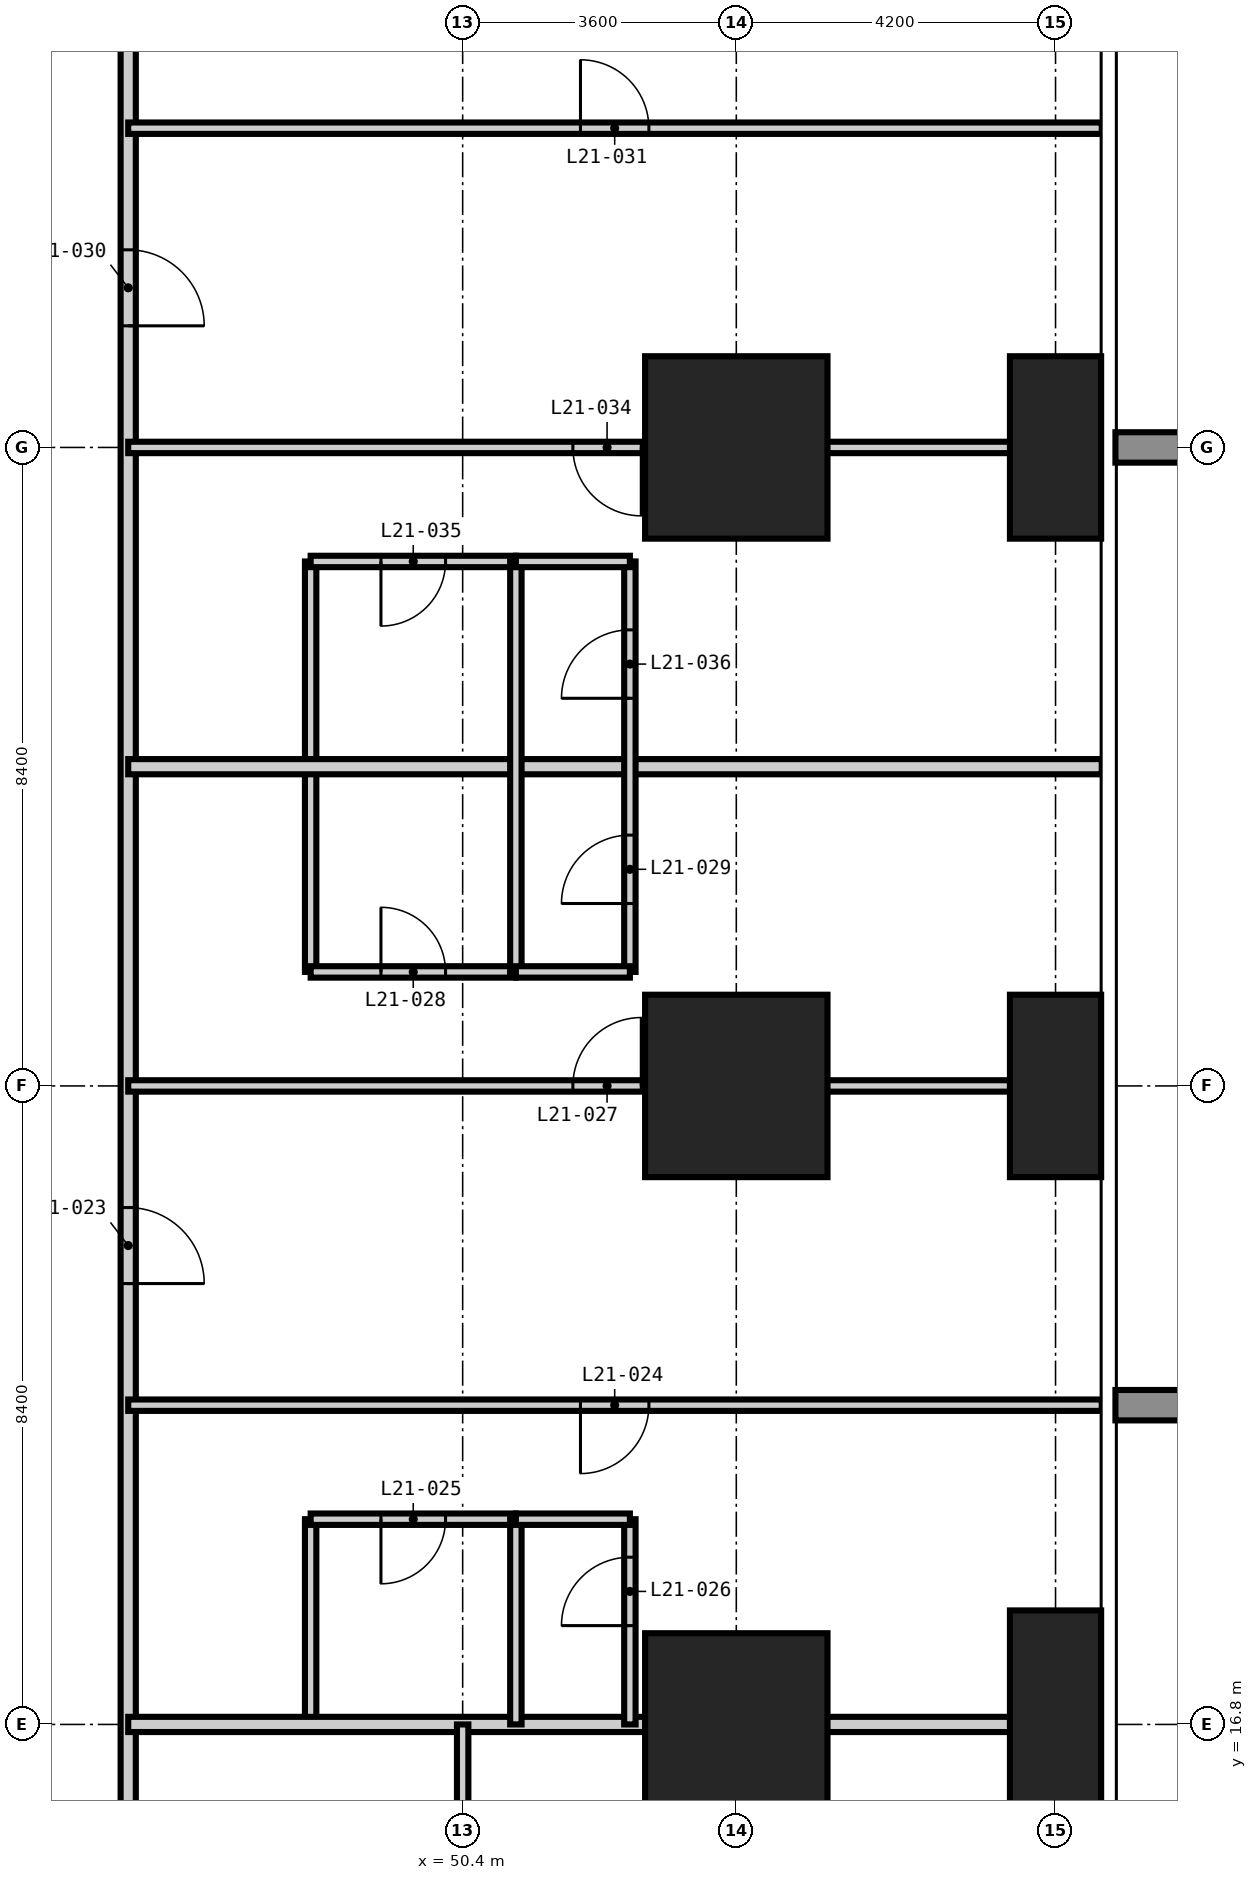
"""IFC4 building model, lengths in metres.
Left out: names, types, materials, properties, quantities, classifications, styles, units other than length and angle.
Written with IfcOpenShell. Run it as: python <this file> out.ifc"""

import sys

from ifc_helpers import new_model, si_unit, direction, frame, frame_2d, origin, origin_2d, place, context, subcontext, project, spatial, rectangle, extrude, element, fill, save


model = new_model("IFC4")
c1 = context("Model", 3, precision=1e-05, world=origin(), true_north=direction((0.0, 1.0)))
c2 = subcontext(c1, "Body", "Model", "MODEL_VIEW")
j1 = project(units=[si_unit("LENGTHUNIT", "METRE"), si_unit("PLANEANGLEUNIT", "RADIAN")], contexts=[c1])
p1 = place(None, origin())
s1 = spatial("IfcSite", under=j1, at=p1, CompositionType="ELEMENT")
p2 = place(p1, origin())
s2 = spatial("IfcBuilding", under=s1, at=p2, CompositionType="ELEMENT")
p3 = place(p2, frame((0.0, 0.0, 84.6)))
s3 = spatial("IfcBuildingStorey", under=s2, at=p3, CompositionType="ELEMENT", Elevation=84.6)
for number, where, z_axis, x_axis in (
    (1, (54.0, 16.8, -0.35), (0.0, 0.0, 1.0), (1.0, 0.0, 0.0)),
    (2, (54.0, 25.2, -0.35), (0.0, 0.0, 1.0), (1.0, 0.0, 0.0)),
    (3, (54.0, 33.6, -0.35), (0.0, 0.0, 1.0), (1.0, 0.0, 0.0)),
):
    element("IfcColumn", number, at=place(p3, frame(where, z_axis=z_axis, x_axis=x_axis)), inside=s3, PredefinedType="COLUMN", context=c2, shape_type="SweptSolid", body=[
        extrude(rectangle(XDim=2.4, YDim=2.4, at=origin_2d()), origin(), (0.0, 0.0, 1.0), 3.55),
    ])
p4 = place(p3, frame((58.2, 16.8, -0.35), z_axis=(0.0, 0.0, 1.0), x_axis=(1.0, 0.0, 0.0)))
e4 = element("IfcColumn", 4, at=p4, inside=s3, PredefinedType="COLUMN", context=c2, shape_type="SweptSolid", body=[
    extrude(rectangle(XDim=1.2, YDim=3.0, at=origin_2d()), origin(), (0.0, 0.0, 1.0), 3.55),
])
for number, where, z_axis, x_axis in (
    (5, (58.2, 25.2, -0.35), (0.0, 0.0, 1.0), (1.0, 0.0, 0.0)),
    (6, (58.2, 33.6, -0.35), (0.0, 0.0, 1.0), (1.0, 0.0, 0.0)),
):
    element("IfcColumn", number, at=place(p3, frame(where, z_axis=z_axis, x_axis=x_axis)), inside=s3, PredefinedType="COLUMN", context=c2, shape_type="SweptSolid", body=[
        extrude(rectangle(XDim=1.2, YDim=2.4, at=origin_2d()), origin(), (0.0, 0.0, 1.0), 3.55),
    ])
p5 = place(p3, frame((48.4, 16.8, 0.0), z_axis=(0.0, 0.0, 1.0), x_axis=(0.0, 1.0, 0.0)))
e7 = element("IfcWall", 7, at=p5, inside=s3, PredefinedType="PARTITIONING", context=c2, shape_type="SweptSolid", body=[
    extrude(rectangle(XDim=2.7, YDim=0.15, at=frame_2d((1.35, 0.0))), origin(), (0.0, 0.0, 1.0), 3.2),
])
p6 = place(p3, frame((48.4, 26.7, 0.0), z_axis=(0.0, 0.0, 1.0), x_axis=(0.0, 1.0, 0.0)))
e8 = element("IfcWall", 8, at=p6, inside=s3, PredefinedType="PARTITIONING", context=c2, shape_type="SweptSolid", body=[
    extrude(rectangle(XDim=5.4, YDim=0.15, at=frame_2d((2.7, 0.0))), origin(), (0.0, 0.0, 1.0), 3.2),
])
p7 = place(p3, frame((48.4, 19.5, 0.0), z_axis=(0.0, 0.0, 1.0), x_axis=(1.0, 0.0, 0.0)))
e9 = element("IfcWall", 9, at=p7, inside=s3, PredefinedType="PARTITIONING", context=c2, shape_type="SweptSolid", body=[
    extrude(rectangle(XDim=2.7, YDim=0.15, at=frame_2d((1.35, 0.0))), origin(), (0.0, 0.0, 1.0), 3.2),
])
p8 = place(p7, frame((0.925, 0.0, 0.0)))
e10 = element("IfcOpeningElement", 10, at=p8, cuts=e9, PredefinedType="OPENING", context=c2, shape_type="SweptSolid", body=[
    extrude(rectangle(XDim=0.85, YDim=2.1, at=frame_2d((0.425, 1.05))), frame((0.0, 0.085, 0.0), z_axis=(0.0, -1.0, 0.0), x_axis=(1.0, 0.0, 0.0)), (0.0, 0.0, 1.0), 0.17),
])
p9 = place(p3, frame((48.4, 26.7, 0.0), z_axis=(0.0, 0.0, 1.0), x_axis=(1.0, 0.0, 0.0)))
e11 = element("IfcWall", 11, at=p9, inside=s3, PredefinedType="PARTITIONING", context=c2, shape_type="SweptSolid", body=[
    extrude(rectangle(XDim=2.7, YDim=0.15, at=frame_2d((1.35, 0.0))), origin(), (0.0, 0.0, 1.0), 3.2),
])
p10 = place(p9, frame((0.925, 0.0, 0.0)))
e12 = element("IfcOpeningElement", 12, at=p10, cuts=e11, PredefinedType="OPENING", context=c2, shape_type="SweptSolid", body=[
    extrude(rectangle(XDim=0.85, YDim=2.1, at=frame_2d((0.425, 1.05))), frame((0.0, 0.085, 0.0), z_axis=(0.0, -1.0, 0.0), x_axis=(1.0, 0.0, 0.0)), (0.0, 0.0, 1.0), 0.17),
])
p11 = place(p3, frame((48.4, 32.1, 0.0), z_axis=(0.0, 0.0, 1.0), x_axis=(1.0, 0.0, 0.0)))
e13 = element("IfcWall", 13, at=p11, inside=s3, PredefinedType="PARTITIONING", context=c2, shape_type="SweptSolid", body=[
    extrude(rectangle(XDim=2.7, YDim=0.15, at=frame_2d((1.35, 0.0))), origin(), (0.0, 0.0, 1.0), 3.2),
])
p12 = place(p11, frame((0.925, 0.0, 0.0)))
e14 = element("IfcOpeningElement", 14, at=p12, cuts=e13, PredefinedType="OPENING", context=c2, shape_type="SweptSolid", body=[
    extrude(rectangle(XDim=0.85, YDim=2.1, at=frame_2d((0.425, 1.05))), frame((0.0, 0.085, 0.0), z_axis=(0.0, -1.0, 0.0), x_axis=(1.0, 0.0, 0.0)), (0.0, 0.0, 1.0), 0.17),
])
p13 = place(p3, frame((46.0, 44.8, 0.0), z_axis=(0.0, 0.0, 1.0), x_axis=(0.0, -1.0, 0.0)))
e15 = element("IfcWall", 15, at=p13, inside=s3, PredefinedType="PARTITIONING", context=c2, shape_type="SweptSolid", body=[
    extrude(rectangle(XDim=31.4, YDim=0.2, at=frame_2d((15.7, 0.0))), origin(), (0.0, 0.0, 1.0), 3.2),
])
p14 = place(p13, frame((21.2, 0.0, 0.0)))
e16 = element("IfcOpeningElement", 16, at=p14, cuts=e15, PredefinedType="OPENING", context=c2, shape_type="SweptSolid", body=[
    extrude(rectangle(XDim=1.0, YDim=2.2, at=frame_2d((0.5, 1.1))), frame((0.0, 0.11, 0.0), z_axis=(0.0, -1.0, 0.0), x_axis=(1.0, 0.0, 0.0)), (0.0, 0.0, 1.0), 0.22),
])
p15 = place(p13, frame((8.6, 0.0, 0.0)))
e17 = element("IfcOpeningElement", 17, at=p15, cuts=e15, PredefinedType="OPENING", context=c2, shape_type="SweptSolid", body=[
    extrude(rectangle(XDim=1.0, YDim=2.2, at=frame_2d((0.5, 1.1))), frame((0.0, 0.11, 0.0), z_axis=(0.0, -1.0, 0.0), x_axis=(1.0, 0.0, 0.0)), (0.0, 0.0, 1.0), 0.22),
])
p16 = place(p13, frame((29.2, 0.0, 0.0)))
e18 = element("IfcOpeningElement", 18, at=p16, cuts=e15, PredefinedType="OPENING", context=c2, shape_type="SweptSolid", body=[
    extrude(rectangle(XDim=1.0, YDim=2.2, at=frame_2d((0.5, 1.1))), frame((0.0, 0.11, 0.0), z_axis=(0.0, -1.0, 0.0), x_axis=(1.0, 0.0, 0.0)), (0.0, 0.0, 1.0), 0.22),
])
p17 = place(p13, frame((0.9, 0.0, 0.0)))
e19 = element("IfcOpeningElement", 19, at=p17, cuts=e15, PredefinedType="OPENING", context=c2, shape_type="SweptSolid", body=[
    extrude(rectangle(XDim=1.0, YDim=2.2, at=frame_2d((0.5, 1.1))), frame((0.0, 0.11, 0.0), z_axis=(0.0, -1.0, 0.0), x_axis=(1.0, 0.0, 0.0)), (0.0, 0.0, 1.0), 0.22),
])
for number, where, z_axis, x_axis in (
    (20, (46.0, 16.8, 0.0), (0.0, 0.0, 1.0), (1.0, 0.0, 0.0)),
    (21, (46.0, 29.4, 0.0), (0.0, 0.0, 1.0), (1.0, 0.0, 0.0)),
):
    element("IfcWall", number, at=place(p3, frame(where, z_axis=z_axis, x_axis=x_axis)), inside=s3, PredefinedType="PARTITIONING", context=c2, shape_type="SweptSolid", body=[
        extrude(rectangle(XDim=12.808, YDim=0.2, at=frame_2d((6.404, 0.0))), origin(), (0.0, 0.0, 1.0), 3.2),
    ])
p18 = place(p3, frame((50.4, -0.008, 0.0), z_axis=(0.0, 0.0, 1.0), x_axis=(0.0, 1.0, 0.0)))
e22 = element("IfcWall", 22, at=p18, inside=s3, PredefinedType="PARTITIONING", context=c2, shape_type="SweptSolid", body=[
    extrude(rectangle(XDim=16.808, YDim=0.15, at=frame_2d((8.404, 0.0))), origin(), (0.0, 0.0, 1.0), 3.2),
])
p19 = place(p18, frame((1.958, 0.0, 0.0)))
e23 = element("IfcOpeningElement", 23, at=p19, cuts=e22, PredefinedType="OPENING", context=c2, shape_type="SweptSolid", body=[
    extrude(rectangle(XDim=0.9, YDim=2.1, at=frame_2d((0.45, 1.05))), frame((0.0, 0.085, 0.0), z_axis=(0.0, -1.0, 0.0), x_axis=(1.0, 0.0, 0.0)), (0.0, 0.0, 1.0), 0.17),
])
p20 = place(p18, frame((12.158, 0.0, 0.0)))
e24 = element("IfcOpeningElement", 24, at=p20, cuts=e22, PredefinedType="OPENING", context=c2, shape_type="SweptSolid", body=[
    extrude(rectangle(XDim=0.9, YDim=2.1, at=frame_2d((0.45, 1.05))), frame((0.0, 0.085, 0.0), z_axis=(0.0, -1.0, 0.0), x_axis=(1.0, 0.0, 0.0)), (0.0, 0.0, 1.0), 0.17),
])
p21 = place(p3, frame((51.1, 16.8, 0.0), z_axis=(0.0, 0.0, 1.0), x_axis=(0.0, 1.0, 0.0)))
e25 = element("IfcWall", 25, at=p21, inside=s3, PredefinedType="PARTITIONING", context=c2, shape_type="SweptSolid", body=[
    extrude(rectangle(XDim=2.7, YDim=0.15, at=frame_2d((1.35, 0.0))), origin(), (0.0, 0.0, 1.0), 3.2),
])
p22 = place(p3, frame((51.1, 26.7, 0.0), z_axis=(0.0, 0.0, 1.0), x_axis=(0.0, 1.0, 0.0)))
e26 = element("IfcWall", 26, at=p22, inside=s3, PredefinedType="PARTITIONING", context=c2, shape_type="SweptSolid", body=[
    extrude(rectangle(XDim=5.4, YDim=0.15, at=frame_2d((2.7, 0.0))), origin(), (0.0, 0.0, 1.0), 3.2),
])
p23 = place(p3, frame((52.6, 16.8, 0.0), z_axis=(0.0, 0.0, 1.0), x_axis=(0.0, 1.0, 0.0)))
e27 = element("IfcWall", 27, at=p23, inside=s3, PredefinedType="PARTITIONING", context=c2, shape_type="SweptSolid", body=[
    extrude(rectangle(XDim=2.7, YDim=0.15, at=frame_2d((1.35, 0.0))), origin(), (0.0, 0.0, 1.0), 3.2),
])
p24 = place(p23, frame((1.3, 0.0, 0.0)))
e28 = element("IfcOpeningElement", 28, at=p24, cuts=e27, PredefinedType="OPENING", context=c2, shape_type="SweptSolid", body=[
    extrude(rectangle(XDim=0.9, YDim=2.1, at=frame_2d((0.45, 1.05))), frame((0.0, 0.085, 0.0), z_axis=(0.0, -1.0, 0.0), x_axis=(1.0, 0.0, 0.0)), (0.0, 0.0, 1.0), 0.17),
])
p25 = place(p3, frame((52.6, 26.7, 0.0), z_axis=(0.0, 0.0, 1.0), x_axis=(0.0, 1.0, 0.0)))
e29 = element("IfcWall", 29, at=p25, inside=s3, PredefinedType="PARTITIONING", context=c2, shape_type="SweptSolid", body=[
    extrude(rectangle(XDim=5.4, YDim=0.15, at=frame_2d((2.7, 0.0))), origin(), (0.0, 0.0, 1.0), 3.2),
])
p26 = place(p25, frame((0.9, 0.0, 0.0)))
e30 = element("IfcOpeningElement", 30, at=p26, cuts=e29, PredefinedType="OPENING", context=c2, shape_type="SweptSolid", body=[
    extrude(rectangle(XDim=0.9, YDim=2.1, at=frame_2d((0.45, 1.05))), frame((0.0, 0.085, 0.0), z_axis=(0.0, -1.0, 0.0), x_axis=(1.0, 0.0, 0.0)), (0.0, 0.0, 1.0), 0.17),
])
p27 = place(p25, frame((3.6, 0.0, 0.0)))
e31 = element("IfcOpeningElement", 31, at=p27, cuts=e29, PredefinedType="OPENING", context=c2, shape_type="SweptSolid", body=[
    extrude(rectangle(XDim=0.9, YDim=2.1, at=frame_2d((0.45, 1.05))), frame((0.0, 0.085, 0.0), z_axis=(0.0, -1.0, 0.0), x_axis=(1.0, 0.0, 0.0)), (0.0, 0.0, 1.0), 0.17),
])
p28 = place(p3, frame((51.1, 19.5, 0.0), z_axis=(0.0, 0.0, 1.0), x_axis=(1.0, 0.0, 0.0)))
e32 = element("IfcWall", 32, at=p28, inside=s3, PredefinedType="PARTITIONING", context=c2, shape_type="SweptSolid", body=[
    extrude(rectangle(XDim=1.5, YDim=0.15, at=frame_2d((0.75, 0.0))), origin(), (0.0, 0.0, 1.0), 3.2),
])
p29 = place(p3, frame((46.0, 21.0, 0.0), z_axis=(0.0, 0.0, 1.0), x_axis=(1.0, 0.0, 0.0)))
e33 = element("IfcWall", 33, at=p29, inside=s3, PredefinedType="PARTITIONING", context=c2, shape_type="SweptSolid", body=[
    extrude(rectangle(XDim=12.808, YDim=0.15, at=frame_2d((6.404, 0.0))), origin(), (0.0, 0.0, 1.0), 3.2),
])
p30 = place(p29, frame((5.95, 0.0, 0.0)))
e34 = element("IfcOpeningElement", 34, at=p30, cuts=e33, PredefinedType="OPENING", context=c2, shape_type="SweptSolid", body=[
    extrude(rectangle(XDim=0.9, YDim=2.1, at=frame_2d((0.45, 1.05))), frame((0.0, 0.085, 0.0), z_axis=(0.0, -1.0, 0.0), x_axis=(1.0, 0.0, 0.0)), (0.0, 0.0, 1.0), 0.17),
])
p31 = place(p3, frame((46.0, 25.2, 0.0), z_axis=(0.0, 0.0, 1.0), x_axis=(1.0, 0.0, 0.0)))
e35 = element("IfcWall", 35, at=p31, inside=s3, PredefinedType="PARTITIONING", context=c2, shape_type="SweptSolid", body=[
    extrude(rectangle(XDim=12.808, YDim=0.15, at=frame_2d((6.404, 0.0))), origin(), (0.0, 0.0, 1.0), 3.2),
])
p32 = place(p31, frame((5.85, 0.0, 0.0)))
e36 = element("IfcOpeningElement", 36, at=p32, cuts=e35, PredefinedType="OPENING", context=c2, shape_type="SweptSolid", body=[
    extrude(rectangle(XDim=0.9, YDim=2.1, at=frame_2d((0.45, 1.05))), frame((0.0, 0.085, 0.0), z_axis=(0.0, -1.0, 0.0), x_axis=(1.0, 0.0, 0.0)), (0.0, 0.0, 1.0), 0.17),
])
for number, where, z_axis, x_axis in (
    (37, (51.1, 26.7, 0.0), (0.0, 0.0, 1.0), (1.0, 0.0, 0.0)),
    (38, (51.1, 32.1, 0.0), (0.0, 0.0, 1.0), (1.0, 0.0, 0.0)),
):
    element("IfcWall", number, at=place(p3, frame(where, z_axis=z_axis, x_axis=x_axis)), inside=s3, PredefinedType="PARTITIONING", context=c2, shape_type="SweptSolid", body=[
        extrude(rectangle(XDim=1.5, YDim=0.15, at=frame_2d((0.75, 0.0))), origin(), (0.0, 0.0, 1.0), 3.2),
    ])
p33 = place(p3, frame((46.0, 33.6, 0.0), z_axis=(0.0, 0.0, 1.0), x_axis=(1.0, 0.0, 0.0)))
e39 = element("IfcWall", 39, at=p33, inside=s3, PredefinedType="PARTITIONING", context=c2, shape_type="SweptSolid", body=[
    extrude(rectangle(XDim=12.808, YDim=0.15, at=frame_2d((6.404, 0.0))), origin(), (0.0, 0.0, 1.0), 3.2),
])
p34 = place(p33, frame((5.85, 0.0, 0.0)))
e40 = element("IfcOpeningElement", 40, at=p34, cuts=e39, PredefinedType="OPENING", context=c2, shape_type="SweptSolid", body=[
    extrude(rectangle(XDim=0.9, YDim=2.1, at=frame_2d((0.45, 1.05))), frame((0.0, 0.085, 0.0), z_axis=(0.0, -1.0, 0.0), x_axis=(1.0, 0.0, 0.0)), (0.0, 0.0, 1.0), 0.17),
])
p35 = place(p3, frame((46.0, 37.8, 0.0), z_axis=(0.0, 0.0, 1.0), x_axis=(1.0, 0.0, 0.0)))
e41 = element("IfcWall", 41, at=p35, inside=s3, PredefinedType="PARTITIONING", context=c2, shape_type="SweptSolid", body=[
    extrude(rectangle(XDim=12.808, YDim=0.15, at=frame_2d((6.404, 0.0))), origin(), (0.0, 0.0, 1.0), 3.2),
])
p36 = place(p35, frame((5.95, 0.0, 0.0)))
e42 = element("IfcOpeningElement", 42, at=p36, cuts=e41, PredefinedType="OPENING", context=c2, shape_type="SweptSolid", body=[
    extrude(rectangle(XDim=0.9, YDim=2.1, at=frame_2d((0.45, 1.05))), frame((0.0, 0.085, 0.0), z_axis=(0.0, -1.0, 0.0), x_axis=(1.0, 0.0, 0.0)), (0.0, 0.0, 1.0), 0.17),
])
p37 = place(p14, origin())
e43 = element("IfcDoor", 43, at=p37, inside=s3, OperationType="SINGLE_SWING_RIGHT", PredefinedType="DOOR", context=c2, shape_type="SweptSolid", body=[
    extrude(rectangle(XDim=1.0, YDim=2.2, at=frame_2d((0.5, 1.1))), frame((0.0, 0.025, 0.0), z_axis=(0.0, -1.0, 0.0), x_axis=(1.0, 0.0, 0.0)), (0.0, 0.0, 1.0), 0.05),
])
fill(e16, e43)
p38 = place(p30, frame((0.9, 0.0, 0.0), z_axis=(0.0, 0.0, 1.0), x_axis=(-1.0, 0.0, 0.0)))
e44 = element("IfcDoor", 44, at=p38, inside=s3, OperationType="SINGLE_SWING_RIGHT", PredefinedType="DOOR", context=c2, shape_type="SweptSolid", body=[
    extrude(rectangle(XDim=0.9, YDim=2.1, at=frame_2d((0.45, 1.05))), frame((0.0, 0.025, 0.0), z_axis=(0.0, -1.0, 0.0), x_axis=(1.0, 0.0, 0.0)), (0.0, 0.0, 1.0), 0.05),
])
fill(e34, e44)
p39 = place(p8, frame((0.85, 0.0, 0.0), z_axis=(0.0, 0.0, 1.0), x_axis=(-1.0, 0.0, 0.0)))
e45 = element("IfcDoor", 45, at=p39, inside=s3, OperationType="SINGLE_SWING_RIGHT", PredefinedType="DOOR", context=c2, shape_type="SweptSolid", body=[
    extrude(rectangle(XDim=0.85, YDim=2.1, at=frame_2d((0.425, 1.05))), frame((0.0, 0.025, 0.0), z_axis=(0.0, -1.0, 0.0), x_axis=(1.0, 0.0, 0.0)), (0.0, 0.0, 1.0), 0.05),
])
fill(e10, e45)
p40 = place(p24, origin())
e46 = element("IfcDoor", 46, at=p40, inside=s3, OperationType="SINGLE_SWING_LEFT", PredefinedType="DOOR", context=c2, shape_type="SweptSolid", body=[
    extrude(rectangle(XDim=0.9, YDim=2.1, at=frame_2d((0.45, 1.05))), frame((0.0, 0.025, 0.0), z_axis=(0.0, -1.0, 0.0), x_axis=(1.0, 0.0, 0.0)), (0.0, 0.0, 1.0), 0.05),
])
fill(e28, e46)
p41 = place(p32, origin())
e47 = element("IfcDoor", 47, at=p41, inside=s3, OperationType="SINGLE_SWING_RIGHT", PredefinedType="DOOR", context=c2, shape_type="SweptSolid", body=[
    extrude(rectangle(XDim=0.9, YDim=2.1, at=frame_2d((0.45, 1.05))), frame((0.0, 0.025, 0.0), z_axis=(0.0, -1.0, 0.0), x_axis=(1.0, 0.0, 0.0)), (0.0, 0.0, 1.0), 0.05),
])
fill(e36, e47)
p42 = place(p10, origin())
e48 = element("IfcDoor", 48, at=p42, inside=s3, OperationType="SINGLE_SWING_LEFT", PredefinedType="DOOR", context=c2, shape_type="SweptSolid", body=[
    extrude(rectangle(XDim=0.85, YDim=2.1, at=frame_2d((0.425, 1.05))), frame((0.0, 0.025, 0.0), z_axis=(0.0, -1.0, 0.0), x_axis=(1.0, 0.0, 0.0)), (0.0, 0.0, 1.0), 0.05),
])
fill(e12, e48)
p43 = place(p26, origin())
e49 = element("IfcDoor", 49, at=p43, inside=s3, OperationType="SINGLE_SWING_LEFT", PredefinedType="DOOR", context=c2, shape_type="SweptSolid", body=[
    extrude(rectangle(XDim=0.9, YDim=2.1, at=frame_2d((0.45, 1.05))), frame((0.0, 0.025, 0.0), z_axis=(0.0, -1.0, 0.0), x_axis=(1.0, 0.0, 0.0)), (0.0, 0.0, 1.0), 0.05),
])
fill(e30, e49)
p44 = place(p15, origin())
e50 = element("IfcDoor", 50, at=p44, inside=s3, OperationType="SINGLE_SWING_RIGHT", PredefinedType="DOOR", context=c2, shape_type="SweptSolid", body=[
    extrude(rectangle(XDim=1.0, YDim=2.2, at=frame_2d((0.5, 1.1))), frame((0.0, 0.025, 0.0), z_axis=(0.0, -1.0, 0.0), x_axis=(1.0, 0.0, 0.0)), (0.0, 0.0, 1.0), 0.05),
])
fill(e17, e50)
p45 = place(p36, origin())
e51 = element("IfcDoor", 51, at=p45, inside=s3, OperationType="SINGLE_SWING_LEFT", PredefinedType="DOOR", context=c2, shape_type="SweptSolid", body=[
    extrude(rectangle(XDim=0.9, YDim=2.1, at=frame_2d((0.45, 1.05))), frame((0.0, 0.025, 0.0), z_axis=(0.0, -1.0, 0.0), x_axis=(1.0, 0.0, 0.0)), (0.0, 0.0, 1.0), 0.05),
])
fill(e42, e51)
p46 = place(p34, frame((0.9, 0.0, 0.0), z_axis=(0.0, 0.0, 1.0), x_axis=(-1.0, 0.0, 0.0)))
e52 = element("IfcDoor", 52, at=p46, inside=s3, OperationType="SINGLE_SWING_LEFT", PredefinedType="DOOR", context=c2, shape_type="SweptSolid", body=[
    extrude(rectangle(XDim=0.9, YDim=2.1, at=frame_2d((0.45, 1.05))), frame((0.0, 0.025, 0.0), z_axis=(0.0, -1.0, 0.0), x_axis=(1.0, 0.0, 0.0)), (0.0, 0.0, 1.0), 0.05),
])
fill(e40, e52)
p47 = place(p12, frame((0.85, 0.0, 0.0), z_axis=(0.0, 0.0, 1.0), x_axis=(-1.0, 0.0, 0.0)))
e53 = element("IfcDoor", 53, at=p47, inside=s3, OperationType="SINGLE_SWING_RIGHT", PredefinedType="DOOR", context=c2, shape_type="SweptSolid", body=[
    extrude(rectangle(XDim=0.85, YDim=2.1, at=frame_2d((0.425, 1.05))), frame((0.0, 0.025, 0.0), z_axis=(0.0, -1.0, 0.0), x_axis=(1.0, 0.0, 0.0)), (0.0, 0.0, 1.0), 0.05),
])
fill(e14, e53)
p48 = place(p27, origin())
e54 = element("IfcDoor", 54, at=p48, inside=s3, OperationType="SINGLE_SWING_LEFT", PredefinedType="DOOR", context=c2, shape_type="SweptSolid", body=[
    extrude(rectangle(XDim=0.9, YDim=2.1, at=frame_2d((0.45, 1.05))), frame((0.0, 0.025, 0.0), z_axis=(0.0, -1.0, 0.0), x_axis=(1.0, 0.0, 0.0)), (0.0, 0.0, 1.0), 0.05),
])
fill(e31, e54)
save(model, sys.argv[1])
